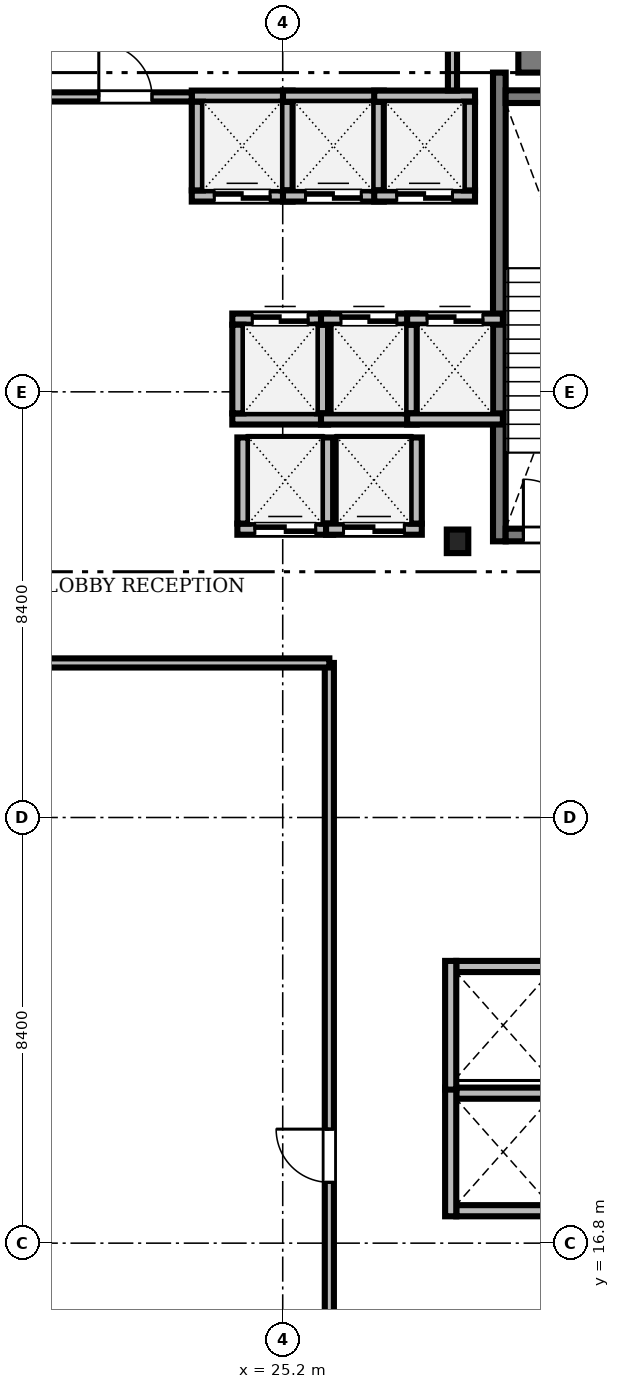
"""IFC4 building model, lengths in metres.
Left out: names, types, materials, properties, quantities, classifications, styles, units other than length and angle.
Written with IfcOpenShell. Run it as: python <this file> out.ifc"""

import sys

from ifc_helpers import new_model, si_unit, direction, frame, frame_2d, origin, origin_2d, place, context, subcontext, project, spatial, rectangle, i_section, extrude, source, transform, mapped, element, fill, save


model = new_model("IFC4")
c1 = context("Model", 3, precision=1e-05, world=origin(), true_north=direction((0.0, 1.0)))
c2 = subcontext(c1, "Body", "Model", "MODEL_VIEW")
j1 = project(units=[si_unit("LENGTHUNIT", "METRE"), si_unit("PLANEANGLEUNIT", "RADIAN")], contexts=[c1])
p1 = place(None, origin())
s1 = spatial("IfcSite", under=j1, at=p1, CompositionType="ELEMENT")
p2 = place(p1, origin())
s2 = spatial("IfcBuilding", under=s1, at=p2, CompositionType="ELEMENT")
p3 = place(p2, frame((0.0, 0.0, 98.7)))
s3 = spatial("IfcBuildingStorey", under=s2, at=p3, CompositionType="ELEMENT", Elevation=98.7)
m1 = source(origin(), c2, "Body", "SweptSolid", [
    extrude(rectangle(XDim=17.52, YDim=0.8, at=frame_2d((8.76, 0.0))), origin(), (0.0, 0.0, 1.0), 4.76),
])
p4 = place(p3, frame((29.85, 40.3, 0.0), z_axis=(0.0, 0.0, 1.0), x_axis=(1.0, 0.0, 0.0)))
e1 = element("IfcWall", 1, at=p4, inside=s3, PredefinedType="SHEAR", context=c2, shape_type="MappedRepresentation", body=[
    mapped(m1, transform((0.0, 0.0, 0.0), scale=1.0)),
])
m2 = source(origin(), c2, "Body", "SweptSolid", [
    extrude(i_section(OverallWidth=0.424, OverallDepth=0.465, WebThickness=0.035, FlangeThickness=0.056, FilletRadius=0.015, at=origin_2d()), origin(), (0.0, 0.0, 1.0), 4.76),
])
p5 = place(p3, frame((28.65, 30.65, 0.0), z_axis=(0.0, 0.0, 1.0), x_axis=(1.0, 0.0, 0.0)))
e2 = element("IfcColumn", 2, at=p5, inside=s3, PredefinedType="COLUMN", context=c2, shape_type="MappedRepresentation", body=[
    mapped(m2, transform((0.0, 0.0, 0.0), scale=1.0)),
])
m3 = source(origin(), c2, "Body", "SweptSolid", [
    extrude(rectangle(XDim=9.25, YDim=0.25, at=frame_2d((4.625, 0.0))), origin(), (0.0, 0.0, 1.0), 4.8),
])
p6 = place(p3, frame((29.475, 30.65, 0.0), z_axis=(0.0, 0.0, 1.0), x_axis=(0.0, 1.0, 0.0)))
e3 = element("IfcWall", 3, at=p6, inside=s3, PredefinedType="SOLIDWALL", context=c2, shape_type="MappedRepresentation", body=[
    mapped(m3, transform((0.0, 0.0, 0.0), scale=1.0)),
])
m4 = source(origin(), c2, "Body", "SweptSolid", [
    extrude(rectangle(XDim=3.15, YDim=0.25, at=frame_2d((1.575, 0.0))), origin(), (0.0, 0.0, 1.0), 4.8),
])
p7 = place(p3, frame((29.6, 39.425, 0.0), z_axis=(0.0, 0.0, 1.0), x_axis=(1.0, 0.0, 0.0)))
e4 = element("IfcWall", 4, at=p7, inside=s3, PredefinedType="SOLIDWALL", context=c2, shape_type="MappedRepresentation", body=[
    mapped(m4, transform((0.0, 0.0, 0.0), scale=1.0)),
])
p8 = place(p3, frame((29.6, 30.775, 0.0), z_axis=(0.0, 0.0, 1.0), x_axis=(1.0, 0.0, 0.0)))
e5 = element("IfcWall", 5, at=p8, inside=s3, PredefinedType="SOLIDWALL", context=c2, shape_type="MappedRepresentation", body=[
    mapped(m4, transform((0.0, 0.0, 0.0), scale=1.0)),
])
m5 = source(origin(), c2, "Body", "SweptSolid", [
    extrude(rectangle(XDim=1.1, YDim=2.2, at=frame_2d((0.55, 1.1))), frame((0.0, 0.135, 0.0), z_axis=(0.0, -1.0, 0.0), x_axis=(1.0, 0.0, 0.0)), (0.0, 0.0, 1.0), 0.27),
])
p9 = place(p8, frame((0.35, 0.0, 0.0)))
e6 = element("IfcOpeningElement", 6, at=p9, cuts=e5, PredefinedType="OPENING", context=c2, shape_type="MappedRepresentation", body=[
    mapped(m5, transform((0.0, 0.0, 0.0), scale=1.0)),
])
m6 = source(origin(), c2, "Body", "SweptSolid", [
    extrude(rectangle(XDim=1.99, YDim=0.22, at=frame_2d((0.995, 0.0))), origin(), (0.0, 0.0, 1.0), 4.76),
])
p10 = place(p3, frame((23.405, 37.465, 0.0), z_axis=(0.0, 0.0, 1.0), x_axis=(1.0, 0.0, 0.0)))
e7 = element("IfcWall", 7, at=p10, inside=s3, PredefinedType="SOLIDWALL", context=c2, shape_type="MappedRepresentation", body=[
    mapped(m6, transform((0.0, 0.0, 0.0), scale=1.0)),
])
m7 = source(origin(), c2, "Body", "SweptSolid", [
    extrude(rectangle(XDim=1.1, YDim=2.2, at=frame_2d((0.55, 1.1))), frame((0.0, 0.12, 0.0), z_axis=(0.0, -1.0, 0.0), x_axis=(1.0, 0.0, 0.0)), (0.0, 0.0, 1.0), 0.24),
])
p11 = place(p10, frame((0.445, 0.0, 0.0)))
e8 = element("IfcOpeningElement", 8, at=p11, cuts=e7, PredefinedType="OPENING", context=c2, shape_type="MappedRepresentation", body=[
    mapped(m7, transform((0.0, 0.0, 0.0), scale=1.0)),
])
p12 = place(p3, frame((23.405, 39.435, 0.0), z_axis=(0.0, 0.0, 1.0), x_axis=(1.0, 0.0, 0.0)))
e9 = element("IfcWall", 9, at=p12, inside=s3, PredefinedType="SOLIDWALL", context=c2, shape_type="MappedRepresentation", body=[
    mapped(m6, transform((0.0, 0.0, 0.0), scale=1.0)),
])
m8 = source(origin(), c2, "Body", "SweptSolid", [
    extrude(rectangle(XDim=1.75, YDim=0.22, at=frame_2d((0.875, 0.0))), origin(), (0.0, 0.0, 1.0), 4.76),
])
for number, where, z_axis, x_axis in (
    (10, (23.515, 37.575, 0.0), (0.0, 0.0, 1.0), (0.0, 1.0, 0.0)),
    (11, (25.285, 37.575, 0.0), (0.0, 0.0, 1.0), (0.0, 1.0, 0.0)),
):
    element("IfcWall", number, at=place(p3, frame(where, z_axis=z_axis, x_axis=x_axis)), inside=s3, PredefinedType="SOLIDWALL", context=c2, shape_type="MappedRepresentation", body=[
        mapped(m8, transform((0.0, 0.0, 0.0), scale=1.0)),
    ])
p13 = place(p3, frame((25.205, 37.465, 0.0), z_axis=(0.0, 0.0, 1.0), x_axis=(1.0, 0.0, 0.0)))
e12 = element("IfcWall", 12, at=p13, inside=s3, PredefinedType="SOLIDWALL", context=c2, shape_type="MappedRepresentation", body=[
    mapped(m6, transform((0.0, 0.0, 0.0), scale=1.0)),
])
p14 = place(p13, frame((0.445, 0.0, 0.0)))
e13 = element("IfcOpeningElement", 13, at=p14, cuts=e12, PredefinedType="OPENING", context=c2, shape_type="MappedRepresentation", body=[
    mapped(m7, transform((0.0, 0.0, 0.0), scale=1.0)),
])
p15 = place(p3, frame((25.205, 39.435, 0.0), z_axis=(0.0, 0.0, 1.0), x_axis=(1.0, 0.0, 0.0)))
e14 = element("IfcWall", 14, at=p15, inside=s3, PredefinedType="SOLIDWALL", context=c2, shape_type="MappedRepresentation", body=[
    mapped(m6, transform((0.0, 0.0, 0.0), scale=1.0)),
])
p16 = place(p3, frame((27.085, 37.575, 0.0), z_axis=(0.0, 0.0, 1.0), x_axis=(0.0, 1.0, 0.0)))
e15 = element("IfcWall", 15, at=p16, inside=s3, PredefinedType="SOLIDWALL", context=c2, shape_type="MappedRepresentation", body=[
    mapped(m8, transform((0.0, 0.0, 0.0), scale=1.0)),
])
m9 = source(origin(), c2, "Body", "SweptSolid", [
    extrude(rectangle(XDim=1.99, YDim=0.22, at=frame_2d((0.995, 0.0))), origin(), (0.0, 0.0, 1.0), 4.76),
])
p17 = place(p3, frame((27.005, 37.465, 0.0), z_axis=(0.0, 0.0, 1.0), x_axis=(1.0, 0.0, 0.0)))
e16 = element("IfcWall", 16, at=p17, inside=s3, PredefinedType="SOLIDWALL", context=c2, shape_type="MappedRepresentation", body=[
    mapped(m9, transform((0.0, 0.0, 0.0), scale=1.0)),
])
p18 = place(p17, frame((0.445, 0.0, 0.0)))
e17 = element("IfcOpeningElement", 17, at=p18, cuts=e16, PredefinedType="OPENING", context=c2, shape_type="MappedRepresentation", body=[
    mapped(m7, transform((0.0, 0.0, 0.0), scale=1.0)),
])
p19 = place(p3, frame((27.005, 39.435, 0.0), z_axis=(0.0, 0.0, 1.0), x_axis=(1.0, 0.0, 0.0)))
e18 = element("IfcWall", 18, at=p19, inside=s3, PredefinedType="SOLIDWALL", context=c2, shape_type="MappedRepresentation", body=[
    mapped(m9, transform((0.0, 0.0, 0.0), scale=1.0)),
])
p20 = place(p3, frame((28.885, 37.575, 0.0), z_axis=(0.0, 0.0, 1.0), x_axis=(0.0, 1.0, 0.0)))
e19 = element("IfcWall", 19, at=p20, inside=s3, PredefinedType="SOLIDWALL", context=c2, shape_type="MappedRepresentation", body=[
    mapped(m8, transform((0.0, 0.0, 0.0), scale=1.0)),
])
m10 = source(origin(), c2, "Body", "SweptSolid", [
    extrude(rectangle(XDim=1.89, YDim=0.22, at=frame_2d((0.945, 0.0))), origin(), (0.0, 0.0, 1.0), 4.76),
])
p21 = place(p3, frame((24.205, 33.065, 0.0), z_axis=(0.0, 0.0, 1.0), x_axis=(1.0, 0.0, 0.0)))
e20 = element("IfcWall", 20, at=p21, inside=s3, PredefinedType="SOLIDWALL", context=c2, shape_type="MappedRepresentation", body=[
    mapped(m10, transform((0.0, 0.0, 0.0), scale=1.0)),
])
p22 = place(p3, frame((24.205, 35.035, 0.0), z_axis=(0.0, 0.0, 1.0), x_axis=(1.0, 0.0, 0.0)))
e21 = element("IfcWall", 21, at=p22, inside=s3, PredefinedType="SOLIDWALL", context=c2, shape_type="MappedRepresentation", body=[
    mapped(m10, transform((0.0, 0.0, 0.0), scale=1.0)),
])
p23 = place(p22, frame((0.395, 0.0, 0.0)))
e22 = element("IfcOpeningElement", 22, at=p23, cuts=e21, PredefinedType="OPENING", context=c2, shape_type="MappedRepresentation", body=[
    mapped(m7, transform((0.0, 0.0, 0.0), scale=1.0)),
])
for number, where, z_axis, x_axis in (
    (23, (24.315, 33.175, 0.0), (0.0, 0.0, 1.0), (0.0, 1.0, 0.0)),
    (24, (25.985, 33.175, 0.0), (0.0, 0.0, 1.0), (0.0, 1.0, 0.0)),
):
    element("IfcWall", number, at=place(p3, frame(where, z_axis=z_axis, x_axis=x_axis)), inside=s3, PredefinedType="SOLIDWALL", context=c2, shape_type="MappedRepresentation", body=[
        mapped(m8, transform((0.0, 0.0, 0.0), scale=1.0)),
    ])
p24 = place(p3, frame((25.955, 33.065, 0.0), z_axis=(0.0, 0.0, 1.0), x_axis=(1.0, 0.0, 0.0)))
e25 = element("IfcWall", 25, at=p24, inside=s3, PredefinedType="SOLIDWALL", context=c2, shape_type="MappedRepresentation", body=[
    mapped(m10, transform((0.0, 0.0, 0.0), scale=1.0)),
])
p25 = place(p3, frame((25.955, 35.035, 0.0), z_axis=(0.0, 0.0, 1.0), x_axis=(1.0, 0.0, 0.0)))
e26 = element("IfcWall", 26, at=p25, inside=s3, PredefinedType="SOLIDWALL", context=c2, shape_type="MappedRepresentation", body=[
    mapped(m10, transform((0.0, 0.0, 0.0), scale=1.0)),
])
p26 = place(p25, frame((0.395, 0.0, 0.0)))
e27 = element("IfcOpeningElement", 27, at=p26, cuts=e26, PredefinedType="OPENING", context=c2, shape_type="MappedRepresentation", body=[
    mapped(m7, transform((0.0, 0.0, 0.0), scale=1.0)),
])
p27 = place(p3, frame((27.735, 33.175, 0.0), z_axis=(0.0, 0.0, 1.0), x_axis=(0.0, 1.0, 0.0)))
e28 = element("IfcWall", 28, at=p27, inside=s3, PredefinedType="SOLIDWALL", context=c2, shape_type="MappedRepresentation", body=[
    mapped(m8, transform((0.0, 0.0, 0.0), scale=1.0)),
])
p28 = place(p3, frame((27.655, 33.065, 0.0), z_axis=(0.0, 0.0, 1.0), x_axis=(1.0, 0.0, 0.0)))
e29 = element("IfcWall", 29, at=p28, inside=s3, PredefinedType="SOLIDWALL", context=c2, shape_type="MappedRepresentation", body=[
    mapped(m10, transform((0.0, 0.0, 0.0), scale=1.0)),
])
p29 = place(p3, frame((27.655, 35.035, 0.0), z_axis=(0.0, 0.0, 1.0), x_axis=(1.0, 0.0, 0.0)))
e30 = element("IfcWall", 30, at=p29, inside=s3, PredefinedType="SOLIDWALL", context=c2, shape_type="MappedRepresentation", body=[
    mapped(m10, transform((0.0, 0.0, 0.0), scale=1.0)),
])
p30 = place(p29, frame((0.395, 0.0, 0.0)))
e31 = element("IfcOpeningElement", 31, at=p30, cuts=e30, PredefinedType="OPENING", context=c2, shape_type="MappedRepresentation", body=[
    mapped(m7, transform((0.0, 0.0, 0.0), scale=1.0)),
])
m11 = source(origin(), c2, "Body", "SweptSolid", [
    extrude(rectangle(XDim=1.89, YDim=0.22, at=frame_2d((0.945, 0.0))), origin(), (0.0, 0.0, 1.0), 4.76),
])
p31 = place(p3, frame((24.305, 30.89, 0.0), z_axis=(0.0, 0.0, 1.0), x_axis=(1.0, 0.0, 0.0)))
e32 = element("IfcWall", 32, at=p31, inside=s3, PredefinedType="SOLIDWALL", context=c2, shape_type="MappedRepresentation", body=[
    mapped(m11, transform((0.0, 0.0, 0.0), scale=1.0)),
])
m12 = source(origin(), c2, "Body", "SweptSolid", [
    extrude(rectangle(XDim=1.2, YDim=2.25, at=frame_2d((0.6, 1.125))), frame((0.0, 0.12, 0.0), z_axis=(0.0, -1.0, 0.0), x_axis=(1.0, 0.0, 0.0)), (0.0, 0.0, 1.0), 0.24),
])
p32 = place(p31, frame((0.345, 0.0, 0.0)))
e33 = element("IfcOpeningElement", 33, at=p32, cuts=e32, PredefinedType="OPENING", context=c2, shape_type="MappedRepresentation", body=[
    mapped(m12, transform((0.0, 0.0, 0.0), scale=1.0)),
])
m13 = source(origin(), c2, "Body", "SweptSolid", [
    extrude(rectangle(XDim=1.7, YDim=0.22, at=frame_2d((0.85, 0.0))), origin(), (0.0, 0.0, 1.0), 4.76),
])
for number, where, z_axis, x_axis in (
    (34, (24.415, 31.0, 0.0), (0.0, 0.0, 1.0), (0.0, 1.0, 0.0)),
    (35, (26.085, 31.0, 0.0), (0.0, 0.0, 1.0), (0.0, 1.0, 0.0)),
):
    element("IfcWall", number, at=place(p3, frame(where, z_axis=z_axis, x_axis=x_axis)), inside=s3, PredefinedType="SOLIDWALL", context=c2, shape_type="MappedRepresentation", body=[
        mapped(m13, transform((0.0, 0.0, 0.0), scale=1.0)),
    ])
p33 = place(p3, frame((26.055, 30.89, 0.0), z_axis=(0.0, 0.0, 1.0), x_axis=(1.0, 0.0, 0.0)))
e36 = element("IfcWall", 36, at=p33, inside=s3, PredefinedType="SOLIDWALL", context=c2, shape_type="MappedRepresentation", body=[
    mapped(m11, transform((0.0, 0.0, 0.0), scale=1.0)),
])
p34 = place(p33, frame((0.345, 0.0, 0.0)))
e37 = element("IfcOpeningElement", 37, at=p34, cuts=e36, PredefinedType="OPENING", context=c2, shape_type="MappedRepresentation", body=[
    mapped(m12, transform((0.0, 0.0, 0.0), scale=1.0)),
])
p35 = place(p3, frame((27.835, 31.0, 0.0), z_axis=(0.0, 0.0, 1.0), x_axis=(0.0, 1.0, 0.0)))
e38 = element("IfcWall", 38, at=p35, inside=s3, PredefinedType="SOLIDWALL", context=c2, shape_type="MappedRepresentation", body=[
    mapped(m13, transform((0.0, 0.0, 0.0), scale=1.0)),
])
m14 = source(origin(), c2, "Body", "SweptSolid", [
    extrude(rectangle(XDim=1.85, YDim=0.22, at=frame_2d((0.925, 0.0))), origin(), (0.0, 0.0, 1.0), 4.76),
])
for number, where, z_axis, x_axis in (
    (39, (28.625, 17.44, 0.0), (0.0, 0.0, 1.0), (1.0, 0.0, 0.0)),
    (40, (28.625, 19.76, 0.0), (0.0, 0.0, 1.0), (1.0, 0.0, 0.0)),
):
    element("IfcWall", number, at=place(p3, frame(where, z_axis=z_axis, x_axis=x_axis)), inside=s3, PredefinedType="SOLIDWALL", context=c2, shape_type="MappedRepresentation", body=[
        mapped(m14, transform((0.0, 0.0, 0.0), scale=1.0)),
    ])
m15 = source(origin(), c2, "Body", "SweptSolid", [
    extrude(rectangle(XDim=2.54, YDim=0.22, at=frame_2d((1.27, 0.0))), origin(), (0.0, 0.0, 1.0), 4.76),
])
p36 = place(p3, frame((28.515, 17.33, 0.0), z_axis=(0.0, 0.0, 1.0), x_axis=(0.0, 1.0, 0.0)))
e41 = element("IfcWall", 41, at=p36, inside=s3, PredefinedType="SOLIDWALL", context=c2, shape_type="MappedRepresentation", body=[
    mapped(m15, transform((0.0, 0.0, 0.0), scale=1.0)),
])
p37 = place(p3, frame((28.625, 22.26, 0.0), z_axis=(0.0, 0.0, 1.0), x_axis=(1.0, 0.0, 0.0)))
e42 = element("IfcWall", 42, at=p37, inside=s3, PredefinedType="SOLIDWALL", context=c2, shape_type="MappedRepresentation", body=[
    mapped(m14, transform((0.0, 0.0, 0.0), scale=1.0)),
])
p38 = place(p3, frame((28.515, 19.83, 0.0), z_axis=(0.0, 0.0, 1.0), x_axis=(0.0, 1.0, 0.0)))
e43 = element("IfcWall", 43, at=p38, inside=s3, PredefinedType="SOLIDWALL", context=c2, shape_type="MappedRepresentation", body=[
    mapped(m15, transform((0.0, 0.0, 0.0), scale=1.0)),
])
m16 = source(origin(), c2, "Body", "SweptSolid", [
    extrude(rectangle(XDim=16.483, YDim=0.18, at=frame_2d((8.241, 0.0))), origin(), (0.0, 0.0, 1.0), 4.002),
])
p39 = place(p3, frame((6.922, 39.42, 0.0), z_axis=(0.0, 0.0, 1.0), x_axis=(1.0, 0.0, 0.0)))
e44 = element("IfcWall", 44, at=p39, inside=s3, PredefinedType="PARTITIONING", context=c2, shape_type="MappedRepresentation", body=[
    mapped(m16, transform((0.0, 0.0, 0.0), scale=1.0)),
])
m17 = source(origin(), c2, "Body", "SweptSolid", [
    extrude(rectangle(XDim=1.05, YDim=2.2, at=frame_2d((0.525, 1.1))), frame((0.0, 0.1, 0.0), z_axis=(0.0, -1.0, 0.0), x_axis=(1.0, 0.0, 0.0)), (0.0, 0.0, 1.0), 0.2),
])
p40 = place(p39, frame((14.648, 0.0, 0.0)))
e45 = element("IfcOpeningElement", 45, at=p40, cuts=e44, PredefinedType="OPENING", context=c2, shape_type="MappedRepresentation", body=[
    mapped(m17, transform((0.0, 0.0, 0.0), scale=1.0)),
])
m18 = source(origin(), c2, "Body", "SweptSolid", [
    extrude(rectangle(XDim=14.45, YDim=0.18, at=frame_2d((7.225, 0.0))), origin(), (0.0, 0.0, 1.0), 4.152),
])
p41 = place(p3, frame((26.12, 13.8, 0.0), z_axis=(0.0, 0.0, 1.0), x_axis=(0.0, 1.0, 0.0)))
e46 = element("IfcWall", 46, at=p41, inside=s3, PredefinedType="PARTITIONING", context=c2, shape_type="MappedRepresentation", body=[
    mapped(m18, transform((0.0, 0.0, 0.0), scale=1.0)),
])
p42 = place(p41, frame((4.2, 0.0, 0.0)))
e47 = element("IfcOpeningElement", 47, at=p42, cuts=e46, PredefinedType="OPENING", context=c2, shape_type="MappedRepresentation", body=[
    mapped(m17, transform((0.0, 0.0, 0.0), scale=1.0)),
])
m19 = source(origin(), c2, "Body", "SweptSolid", [
    extrude(rectangle(XDim=19.4, YDim=0.18, at=frame_2d((9.7, 0.0))), origin(), (0.0, 0.0, 1.0), 4.002),
])
p43 = place(p3, frame((6.72, 28.25, 0.0), z_axis=(0.0, 0.0, 1.0), x_axis=(1.0, 0.0, 0.0)))
e48 = element("IfcWall", 48, at=p43, inside=s3, PredefinedType="PARTITIONING", context=c2, shape_type="MappedRepresentation", body=[
    mapped(m19, transform((0.0, 0.0, 0.0), scale=1.0)),
])
m20 = source(origin(), c2, "Body", "SweptSolid", [
    extrude(rectangle(XDim=8.933, YDim=0.18, at=frame_2d((4.466, 0.0))), origin(), (0.0, 0.0, 1.0), 4.002),
])
p44 = place(p3, frame((28.55, 39.547, 0.0), z_axis=(0.0, 0.0, 1.0), x_axis=(0.0, 1.0, 0.0)))
e49 = element("IfcWall", 49, at=p44, inside=s3, PredefinedType="PARTITIONING", context=c2, shape_type="MappedRepresentation", body=[
    mapped(m20, transform((0.0, 0.0, 0.0), scale=1.0)),
])
m21 = source(origin(), c2, "Body", "SweptSolid", [
    extrude(rectangle(XDim=1.1, YDim=2.2, at=frame_2d((0.55, 1.1))), frame((0.0, 0.025, 0.0), z_axis=(0.0, -1.0, 0.0), x_axis=(1.0, 0.0, 0.0)), (0.0, 0.0, 1.0), 0.05),
])
p45 = place(p9, origin())
e50 = element("IfcDoor", 50, at=p45, inside=s3, OperationType="SINGLE_SWING_LEFT", PredefinedType="DOOR", context=c2, shape_type="MappedRepresentation", body=[
    mapped(m21, transform((0.0, 0.0, 0.0), scale=1.0)),
])
fill(e6, e50)
p46 = place(p11, origin())
e51 = element("IfcDoor", 51, at=p46, inside=s3, OperationType="DOUBLE_DOOR_SLIDING", PredefinedType="DOOR", context=c2, shape_type="MappedRepresentation", body=[
    mapped(m21, transform((0.0, 0.0, 0.0), scale=1.0)),
])
fill(e8, e51)
p47 = place(p14, origin())
e52 = element("IfcDoor", 52, at=p47, inside=s3, OperationType="DOUBLE_DOOR_SLIDING", PredefinedType="DOOR", context=c2, shape_type="MappedRepresentation", body=[
    mapped(m21, transform((0.0, 0.0, 0.0), scale=1.0)),
])
fill(e13, e52)
p48 = place(p18, origin())
e53 = element("IfcDoor", 53, at=p48, inside=s3, OperationType="DOUBLE_DOOR_SLIDING", PredefinedType="DOOR", context=c2, shape_type="MappedRepresentation", body=[
    mapped(m21, transform((0.0, 0.0, 0.0), scale=1.0)),
])
fill(e17, e53)
p49 = place(p23, origin())
e54 = element("IfcDoor", 54, at=p49, inside=s3, OperationType="DOUBLE_DOOR_SLIDING", PredefinedType="DOOR", context=c2, shape_type="MappedRepresentation", body=[
    mapped(m21, transform((0.0, 0.0, 0.0), scale=1.0)),
])
fill(e22, e54)
p50 = place(p26, origin())
e55 = element("IfcDoor", 55, at=p50, inside=s3, OperationType="DOUBLE_DOOR_SLIDING", PredefinedType="DOOR", context=c2, shape_type="MappedRepresentation", body=[
    mapped(m21, transform((0.0, 0.0, 0.0), scale=1.0)),
])
fill(e27, e55)
p51 = place(p30, origin())
e56 = element("IfcDoor", 56, at=p51, inside=s3, OperationType="DOUBLE_DOOR_SLIDING", PredefinedType="DOOR", context=c2, shape_type="MappedRepresentation", body=[
    mapped(m21, transform((0.0, 0.0, 0.0), scale=1.0)),
])
fill(e31, e56)
m22 = source(origin(), c2, "Body", "SweptSolid", [
    extrude(rectangle(XDim=1.2, YDim=2.25, at=frame_2d((0.6, 1.125))), frame((0.0, 0.025, 0.0), z_axis=(0.0, -1.0, 0.0), x_axis=(1.0, 0.0, 0.0)), (0.0, 0.0, 1.0), 0.05),
])
p52 = place(p32, origin())
e57 = element("IfcDoor", 57, at=p52, inside=s3, OperationType="DOUBLE_DOOR_SLIDING", PredefinedType="DOOR", context=c2, shape_type="MappedRepresentation", body=[
    mapped(m22, transform((0.0, 0.0, 0.0), scale=1.0)),
])
fill(e33, e57)
p53 = place(p34, origin())
e58 = element("IfcDoor", 58, at=p53, inside=s3, OperationType="DOUBLE_DOOR_SLIDING", PredefinedType="DOOR", context=c2, shape_type="MappedRepresentation", body=[
    mapped(m22, transform((0.0, 0.0, 0.0), scale=1.0)),
])
fill(e37, e58)
m23 = source(origin(), c2, "Body", "SweptSolid", [
    extrude(rectangle(XDim=1.05, YDim=2.2, at=frame_2d((0.525, 1.1))), frame((0.0, 0.025, 0.0), z_axis=(0.0, -1.0, 0.0), x_axis=(1.0, 0.0, 0.0)), (0.0, 0.0, 1.0), 0.05),
])
p54 = place(p40, origin())
e59 = element("IfcDoor", 59, at=p54, inside=s3, OperationType="SINGLE_SWING_LEFT", PredefinedType="DOOR", context=c2, shape_type="MappedRepresentation", body=[
    mapped(m23, transform((0.0, 0.0, 0.0), scale=1.0)),
])
fill(e45, e59)
p55 = place(p42, origin())
e60 = element("IfcDoor", 60, at=p55, inside=s3, OperationType="SINGLE_SWING_RIGHT", PredefinedType="DOOR", context=c2, shape_type="MappedRepresentation", body=[
    mapped(m23, transform((0.0, 0.0, 0.0), scale=1.0)),
])
fill(e47, e60)
save(model, sys.argv[1])
